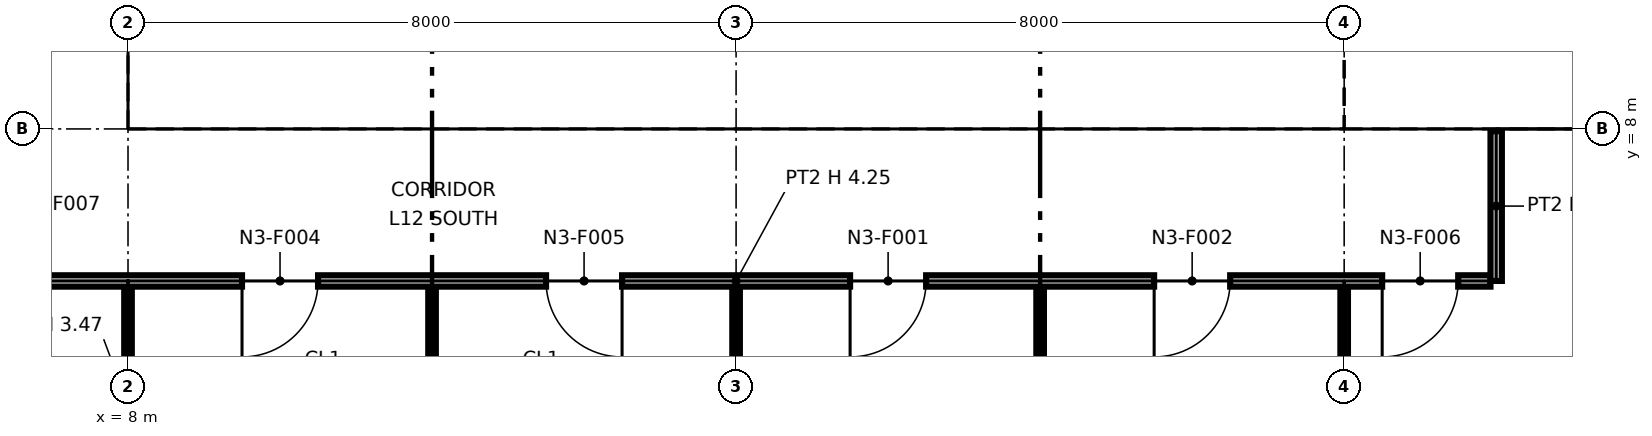
"""IFC4 building model, lengths in metres.
Left out: names, types, materials, properties, quantities, classifications, styles, units other than length and angle.
Written with IfcOpenShell. Run it as: python <this file> out.ifc"""

import sys

from ifc_helpers import new_model, si_unit, direction, frame, frame_2d, origin, origin_2d, place, context, subcontext, project, spatial, polyline, rectangle, i_section, outline, extrude, element, fill, save


model = new_model("IFC4")
c1 = context("Model", 3, precision=1e-05, world=origin(), true_north=direction((0.0, 1.0)))
c2 = subcontext(c1, "Body", "Model", "MODEL_VIEW")
j1 = project(units=[si_unit("LENGTHUNIT", "METRE"), si_unit("PLANEANGLEUNIT", "RADIAN")], contexts=[c1])
p1 = place(None, origin())
s1 = spatial("IfcSite", under=j1, at=p1, CompositionType="ELEMENT")
p2 = place(p1, origin())
s2 = spatial("IfcBuilding", under=s1, at=p2, CompositionType="ELEMENT")
p3 = place(p2, frame((0.0, 0.0, 70.0)))
s3 = spatial("IfcBuildingStorey", under=s2, at=p3, CompositionType="ELEMENT", Elevation=70.0)
for number, where, z_axis, x_axis in (
    (1, (8.0, 8.0, 0.0), (0.0, 0.0, 1.0), (1.0, 0.0, 0.0)),
    (2, (16.0, 8.0, 0.0), (0.0, 0.0, 1.0), (1.0, 0.0, 0.0)),
):
    element("IfcColumn", number, at=place(p3, frame(where, z_axis=z_axis, x_axis=x_axis)), inside=s3, PredefinedType="COLUMN", context=c2, shape_type="SweptSolid", body=[
        extrude(i_section(OverallWidth=0.406, OverallDepth=0.417, WebThickness=0.03, FlangeThickness=0.048, at=origin_2d()), origin(), (0.0, 0.0, 1.0), 4.25),
    ])
p4 = place(p3, frame((24.0, 8.0, 0.0), z_axis=(0.0, 0.0, 1.0), x_axis=(1.0, 0.0, 0.0)))
e3 = element("IfcColumn", 3, at=p4, inside=s3, PredefinedType="COLUMN", context=c2, shape_type="SweptSolid", body=[
    extrude(i_section(OverallWidth=0.411, OverallDepth=0.434, WebThickness=0.036, FlangeThickness=0.057, at=origin_2d()), origin(), (0.0, 0.0, 1.0), 4.25),
])
p5 = place(p3, frame((8.65, 8.75, 0.0), z_axis=(0.0, 0.0, 1.0), x_axis=(1.0, 0.0, 0.0)))
e4 = element("IfcWall", 4, at=p5, inside=s3, PredefinedType="PARTITIONING", context=c2, shape_type="SweptSolid", body=[
    extrude(outline(polyline([(0.0, 0.0), (14.7, 0.0), (14.7, 4.25), (7.469, 4.25), (7.469, 3.632), (7.231, 3.632), (7.23, 4.25), (0.0, 4.25), (0.0, 0.0)])), frame((0.0, 0.1, 0.0), z_axis=(0.0, -1.0, 0.0), x_axis=(1.0, 0.0, 0.0)), (0.0, 0.0, 1.0), 0.2),
])
p6 = place(p5, frame((1.3, 0.0, 0.0)))
e5 = element("IfcOpeningElement", 5, at=p6, cuts=e4, PredefinedType="OPENING", context=c2, shape_type="SweptSolid", body=[
    extrude(rectangle(XDim=1.4, YDim=2.1, at=frame_2d((0.7, 1.05))), frame((0.0, 0.11, 0.0), z_axis=(0.0, -1.0, 0.0), x_axis=(1.0, 0.0, 0.0)), (0.0, 0.0, 1.0), 0.22),
])
p7 = place(p5, frame((4.6, 0.0, 0.0)))
e6 = element("IfcOpeningElement", 6, at=p7, cuts=e4, PredefinedType="OPENING", context=c2, shape_type="SweptSolid", body=[
    extrude(rectangle(XDim=1.4, YDim=2.1, at=frame_2d((0.7, 1.05))), frame((0.0, 0.11, 0.0), z_axis=(0.0, -1.0, 0.0), x_axis=(1.0, 0.0, 0.0)), (0.0, 0.0, 1.0), 0.22),
])
p8 = place(p5, frame((10.4, 0.0, 0.0)))
e7 = element("IfcOpeningElement", 7, at=p8, cuts=e4, PredefinedType="OPENING", context=c2, shape_type="SweptSolid", body=[
    extrude(rectangle(XDim=1.2, YDim=2.1, at=frame_2d((0.6, 1.05))), frame((0.0, 0.11, 0.0), z_axis=(0.0, -1.0, 0.0), x_axis=(1.0, 0.0, 0.0)), (0.0, 0.0, 1.0), 0.22),
])
p9 = place(p3, frame((8.75, 8.85, 0.0), z_axis=(0.0, 0.0, 1.0), x_axis=(0.0, 1.0, 0.0)))
e8 = element("IfcWall", 8, at=p9, inside=s3, PredefinedType="PARTITIONING", context=c2, shape_type="SweptSolid", body=[
    extrude(outline(polyline([(0.0, 0.0), (14.3, 0.0), (14.3, 4.25), (10.231, 4.25), (10.23, 3.789), (10.07, 3.789), (10.069, 4.25), (7.27, 4.25), (7.269, 3.632), (7.031, 3.632), (7.031, 4.25), (0.0, 4.25), (0.0, 0.0)])), frame((0.0, 0.1, 0.0), z_axis=(0.0, -1.0, 0.0), x_axis=(1.0, 0.0, 0.0)), (0.0, 0.0, 1.0), 0.2),
])
p10 = place(p9, frame((8.3, 0.0, 0.0)))
e9 = element("IfcOpeningElement", 9, at=p10, cuts=e8, PredefinedType="OPENING", context=c2, shape_type="SweptSolid", body=[
    extrude(rectangle(XDim=1.8, YDim=2.1, at=frame_2d((0.9, 1.05))), frame((0.0, 0.11, 0.0), z_axis=(0.0, -1.0, 0.0), x_axis=(1.0, 0.0, 0.0)), (0.0, 0.0, 1.0), 0.22),
])
p11 = place(p3, frame((12.4, 8.85, 0.0), z_axis=(0.0, 0.0, 1.0), x_axis=(0.0, 1.0, 0.0)))
e10 = element("IfcWall", 10, at=p11, inside=s3, PredefinedType="PARTITIONING", context=c2, shape_type="SweptSolid", body=[
    extrude(rectangle(XDim=6.85, YDim=0.2, at=frame_2d((3.425, 0.0))), origin(), (0.0, 0.0, 1.0), 4.25),
])
p12 = place(p3, frame((15.85, 8.85, 0.0), z_axis=(0.0, 0.0, 1.0), x_axis=(0.0, 1.0, 0.0)))
e11 = element("IfcWall", 11, at=p12, inside=s3, PredefinedType="PARTITIONING", context=c2, shape_type="SweptSolid", body=[
    extrude(rectangle(XDim=1.55, YDim=0.9, at=frame_2d((0.775, 0.0))), origin(), (0.0, 0.0, 1.0), 3.632),
])
p13 = place(p12, frame((0.3, 0.0, 0.0)))
e12 = element("IfcOpeningElement", 12, at=p13, cuts=e11, PredefinedType="OPENING", context=c2, shape_type="SweptSolid", body=[
    extrude(rectangle(XDim=1.1, YDim=2.1, at=frame_2d((0.55, 1.05))), frame((0.0, 0.46, 0.0), z_axis=(0.0, -1.0, 0.0), x_axis=(1.0, 0.0, 0.0)), (0.0, 0.0, 1.0), 0.92),
])
p14 = place(p3, frame((23.25, 8.85, 0.0), z_axis=(0.0, 0.0, 1.0), x_axis=(0.0, 1.0, 0.0)))
e13 = element("IfcWall", 13, at=p14, inside=s3, PredefinedType="PARTITIONING", context=c2, shape_type="SweptSolid", body=[
    extrude(outline(polyline([(0.0, 0.0), (14.3, 0.0), (14.3, 4.25), (11.231, 4.25), (11.23, 3.789), (11.07, 3.789), (11.069, 4.25), (7.27, 4.25), (7.269, 3.632), (7.031, 3.632), (7.031, 4.25), (1.231, 4.25), (1.23, 3.789), (1.07, 3.789), (1.069, 4.25), (0.0, 4.25), (0.0, 0.0)])), frame((0.0, 0.1, 0.0), z_axis=(0.0, -1.0, 0.0), x_axis=(1.0, 0.0, 0.0)), (0.0, 0.0, 1.0), 0.2),
])
p15 = place(p14, frame((8.3, 0.0, 0.0)))
e14 = element("IfcOpeningElement", 14, at=p15, cuts=e13, PredefinedType="OPENING", context=c2, shape_type="SweptSolid", body=[
    extrude(rectangle(XDim=1.8, YDim=2.1, at=frame_2d((0.9, 1.05))), frame((0.0, 0.11, 0.0), z_axis=(0.0, -1.0, 0.0), x_axis=(1.0, 0.0, 0.0)), (0.0, 0.0, 1.0), 0.22),
])
p16 = place(p3, frame((24.65, 8.75, 0.0), z_axis=(0.0, 0.0, 1.0), x_axis=(1.0, 0.0, 0.0)))
e15 = element("IfcWall", 15, at=p16, inside=s3, PredefinedType="PARTITIONING", context=c2, shape_type="SweptSolid", body=[
    extrude(outline(polyline([(0.0, 0.0), (14.7, 0.0), (14.7, 4.25), (7.469, 4.25), (7.469, 3.632), (7.231, 3.632), (7.23, 4.25), (0.0, 4.25), (0.0, 0.0)])), frame((0.0, 0.1, 0.0), z_axis=(0.0, -1.0, 0.0), x_axis=(1.0, 0.0, 0.0)), (0.0, 0.0, 1.0), 0.2),
])
p17 = place(p3, frame((24.75, 8.85, 0.0), z_axis=(0.0, 0.0, 1.0), x_axis=(0.0, 1.0, 0.0)))
e16 = element("IfcWall", 16, at=p17, inside=s3, PredefinedType="PARTITIONING", context=c2, shape_type="SweptSolid", body=[
    extrude(outline(polyline([(0.0, 0.0), (6.3, 0.0), (6.3, 4.25), (3.231, 4.25), (3.23, 3.789), (3.07, 3.789), (3.069, 4.25), (0.0, 4.25), (0.0, 0.0)])), frame((0.0, 0.1, 0.0), z_axis=(0.0, -1.0, 0.0), x_axis=(1.0, 0.0, 0.0)), (0.0, 0.0, 1.0), 0.2),
])
p18 = place(p3, frame((20.0, 2.5, 0.0), z_axis=(0.0, 0.0, 1.0), x_axis=(0.0, 1.0, 0.0)))
e17 = element("IfcWall", 17, at=p18, inside=s3, PredefinedType="PARTITIONING", context=c2, shape_type="SweptSolid", body=[
    extrude(rectangle(XDim=3.425, YDim=0.1, at=frame_2d((1.712, 0.0))), origin(), (0.0, 0.0, 1.0), 3.47),
])
for number, where, z_axis, x_axis in (
    (18, (8.0, 2.83, 0.0), (0.0, 0.0, 1.0), (0.0, 1.0, 0.0)),
    (19, (12.0, 2.83, 0.0), (0.0, 0.0, 1.0), (0.0, 1.0, 0.0)),
    (20, (16.0, 2.83, 0.0), (0.0, 0.0, 1.0), (0.0, 1.0, 0.0)),
    (21, (24.0, 2.83, 0.0), (0.0, 0.0, 1.0), (0.0, 1.0, 0.0)),
):
    element("IfcWall", number, at=place(p3, frame(where, z_axis=z_axis, x_axis=x_axis)), inside=s3, PredefinedType="PARTITIONING", context=c2, shape_type="SweptSolid", body=[
        extrude(rectangle(XDim=3.095, YDim=0.1, at=frame_2d((1.547, 0.0))), origin(), (0.0, 0.0, 1.0), 3.47),
    ])
p19 = place(p3, frame((6.075, 6.0, 0.0), z_axis=(0.0, 0.0, 1.0), x_axis=(1.0, 0.0, 0.0)))
e22 = element("IfcWall", 22, at=p19, inside=s3, PredefinedType="PARTITIONING", context=c2, shape_type="SweptSolid", body=[
    extrude(rectangle(XDim=19.85, YDim=0.15, at=frame_2d((9.925, 0.0))), origin(), (0.0, 0.0, 1.0), 4.25),
])
p20 = place(p19, frame((12.425, 0.0, 0.0), z_axis=(0.0, 0.0, 1.0), x_axis=(-1.0, 0.0, 0.0)))
e23 = element("IfcOpeningElement", 23, at=p20, cuts=e22, PredefinedType="OPENING", context=c2, shape_type="SweptSolid", body=[
    extrude(rectangle(XDim=1.0, YDim=2.1, at=frame_2d((0.5, 1.05))), frame((0.0, 0.085, 0.0), z_axis=(0.0, -1.0, 0.0), x_axis=(1.0, 0.0, 0.0)), (0.0, 0.0, 1.0), 0.17),
])
p21 = place(p19, frame((16.425, 0.0, 0.0), z_axis=(0.0, 0.0, 1.0), x_axis=(-1.0, 0.0, 0.0)))
e24 = element("IfcOpeningElement", 24, at=p21, cuts=e22, PredefinedType="OPENING", context=c2, shape_type="SweptSolid", body=[
    extrude(rectangle(XDim=1.0, YDim=2.1, at=frame_2d((0.5, 1.05))), frame((0.0, 0.085, 0.0), z_axis=(0.0, -1.0, 0.0), x_axis=(1.0, 0.0, 0.0)), (0.0, 0.0, 1.0), 0.17),
])
p22 = place(p19, frame((4.425, 0.0, 0.0), z_axis=(0.0, 0.0, 1.0), x_axis=(-1.0, 0.0, 0.0)))
e25 = element("IfcOpeningElement", 25, at=p22, cuts=e22, PredefinedType="OPENING", context=c2, shape_type="SweptSolid", body=[
    extrude(rectangle(XDim=1.0, YDim=2.1, at=frame_2d((0.5, 1.05))), frame((0.0, 0.085, 0.0), z_axis=(0.0, -1.0, 0.0), x_axis=(1.0, 0.0, 0.0)), (0.0, 0.0, 1.0), 0.17),
])
p23 = place(p19, frame((8.425, 0.0, 0.0), z_axis=(0.0, 0.0, 1.0), x_axis=(-1.0, 0.0, 0.0)))
e26 = element("IfcOpeningElement", 26, at=p23, cuts=e22, PredefinedType="OPENING", context=c2, shape_type="SweptSolid", body=[
    extrude(rectangle(XDim=1.0, YDim=2.1, at=frame_2d((0.5, 1.05))), frame((0.0, 0.085, 0.0), z_axis=(0.0, -1.0, 0.0), x_axis=(1.0, 0.0, 0.0)), (0.0, 0.0, 1.0), 0.17),
])
p24 = place(p19, frame((19.425, 0.0, 0.0), z_axis=(0.0, 0.0, 1.0), x_axis=(-1.0, 0.0, 0.0)))
e27 = element("IfcOpeningElement", 27, at=p24, cuts=e22, PredefinedType="OPENING", context=c2, shape_type="SweptSolid", body=[
    extrude(rectangle(XDim=1.0, YDim=2.1, at=frame_2d((0.5, 1.05))), frame((0.0, 0.085, 0.0), z_axis=(0.0, -1.0, 0.0), x_axis=(1.0, 0.0, 0.0)), (0.0, 0.0, 1.0), 0.17),
])
p25 = place(p3, frame((26.0, 6.0, 0.0), z_axis=(0.0, 0.0, 1.0), x_axis=(0.0, 1.0, 0.0)))
e28 = element("IfcWall", 28, at=p25, inside=s3, PredefinedType="PARTITIONING", context=c2, shape_type="SweptSolid", body=[
    extrude(rectangle(XDim=1.97, YDim=0.15, at=frame_2d((0.985, 0.0))), origin(), (0.0, 0.0, 1.0), 4.25),
])
p26 = place(p6, origin())
e29 = element("IfcDoor", 29, at=p26, inside=s3, OperationType="DOUBLE_DOOR_SINGLE_SWING", PredefinedType="NOTDEFINED", context=c2, shape_type="SweptSolid", body=[
    extrude(rectangle(XDim=1.4, YDim=2.1, at=frame_2d((0.7, 1.05))), frame((0.0, 0.025, 0.0), z_axis=(0.0, -1.0, 0.0), x_axis=(1.0, 0.0, 0.0)), (0.0, 0.0, 1.0), 0.05),
])
fill(e5, e29)
p27 = place(p7, origin())
e30 = element("IfcDoor", 30, at=p27, inside=s3, OperationType="DOUBLE_DOOR_SINGLE_SWING", PredefinedType="NOTDEFINED", context=c2, shape_type="SweptSolid", body=[
    extrude(rectangle(XDim=1.4, YDim=2.1, at=frame_2d((0.7, 1.05))), frame((0.0, 0.025, 0.0), z_axis=(0.0, -1.0, 0.0), x_axis=(1.0, 0.0, 0.0)), (0.0, 0.0, 1.0), 0.05),
])
fill(e6, e30)
p28 = place(p8, origin())
e31 = element("IfcDoor", 31, at=p28, inside=s3, OperationType="SINGLE_SWING_RIGHT", PredefinedType="NOTDEFINED", context=c2, shape_type="SweptSolid", body=[
    extrude(rectangle(XDim=1.2, YDim=2.1, at=frame_2d((0.6, 1.05))), frame((0.0, 0.025, 0.0), z_axis=(0.0, -1.0, 0.0), x_axis=(1.0, 0.0, 0.0)), (0.0, 0.0, 1.0), 0.05),
])
fill(e7, e31)
p29 = place(p20, origin())
e32 = element("IfcDoor", 32, at=p29, inside=s3, OperationType="SINGLE_SWING_RIGHT", PredefinedType="DOOR", context=c2, shape_type="SweptSolid", body=[
    extrude(rectangle(XDim=1.0, YDim=2.1, at=frame_2d((0.5, 1.05))), frame((0.0, 0.025, 0.0), z_axis=(0.0, -1.0, 0.0), x_axis=(1.0, 0.0, 0.0)), (0.0, 0.0, 1.0), 0.05),
])
fill(e23, e32)
p30 = place(p21, origin())
e33 = element("IfcDoor", 33, at=p30, inside=s3, OperationType="SINGLE_SWING_RIGHT", PredefinedType="DOOR", context=c2, shape_type="SweptSolid", body=[
    extrude(rectangle(XDim=1.0, YDim=2.1, at=frame_2d((0.5, 1.05))), frame((0.0, 0.025, 0.0), z_axis=(0.0, -1.0, 0.0), x_axis=(1.0, 0.0, 0.0)), (0.0, 0.0, 1.0), 0.05),
])
fill(e24, e33)
p31 = place(p22, origin())
e34 = element("IfcDoor", 34, at=p31, inside=s3, OperationType="SINGLE_SWING_RIGHT", PredefinedType="DOOR", context=c2, shape_type="SweptSolid", body=[
    extrude(rectangle(XDim=1.0, YDim=2.1, at=frame_2d((0.5, 1.05))), frame((0.0, 0.025, 0.0), z_axis=(0.0, -1.0, 0.0), x_axis=(1.0, 0.0, 0.0)), (0.0, 0.0, 1.0), 0.05),
])
fill(e25, e34)
p32 = place(p23, origin())
e35 = element("IfcDoor", 35, at=p32, inside=s3, OperationType="SINGLE_SWING_LEFT", PredefinedType="DOOR", context=c2, shape_type="SweptSolid", body=[
    extrude(rectangle(XDim=1.0, YDim=2.1, at=frame_2d((0.5, 1.05))), frame((0.0, 0.025, 0.0), z_axis=(0.0, -1.0, 0.0), x_axis=(1.0, 0.0, 0.0)), (0.0, 0.0, 1.0), 0.05),
])
fill(e26, e35)
p33 = place(p24, origin())
e36 = element("IfcDoor", 36, at=p33, inside=s3, OperationType="SINGLE_SWING_RIGHT", PredefinedType="DOOR", context=c2, shape_type="SweptSolid", body=[
    extrude(rectangle(XDim=1.0, YDim=2.1, at=frame_2d((0.5, 1.05))), frame((0.0, 0.025, 0.0), z_axis=(0.0, -1.0, 0.0), x_axis=(1.0, 0.0, 0.0)), (0.0, 0.0, 1.0), 0.05),
])
fill(e27, e36)
save(model, sys.argv[1])
